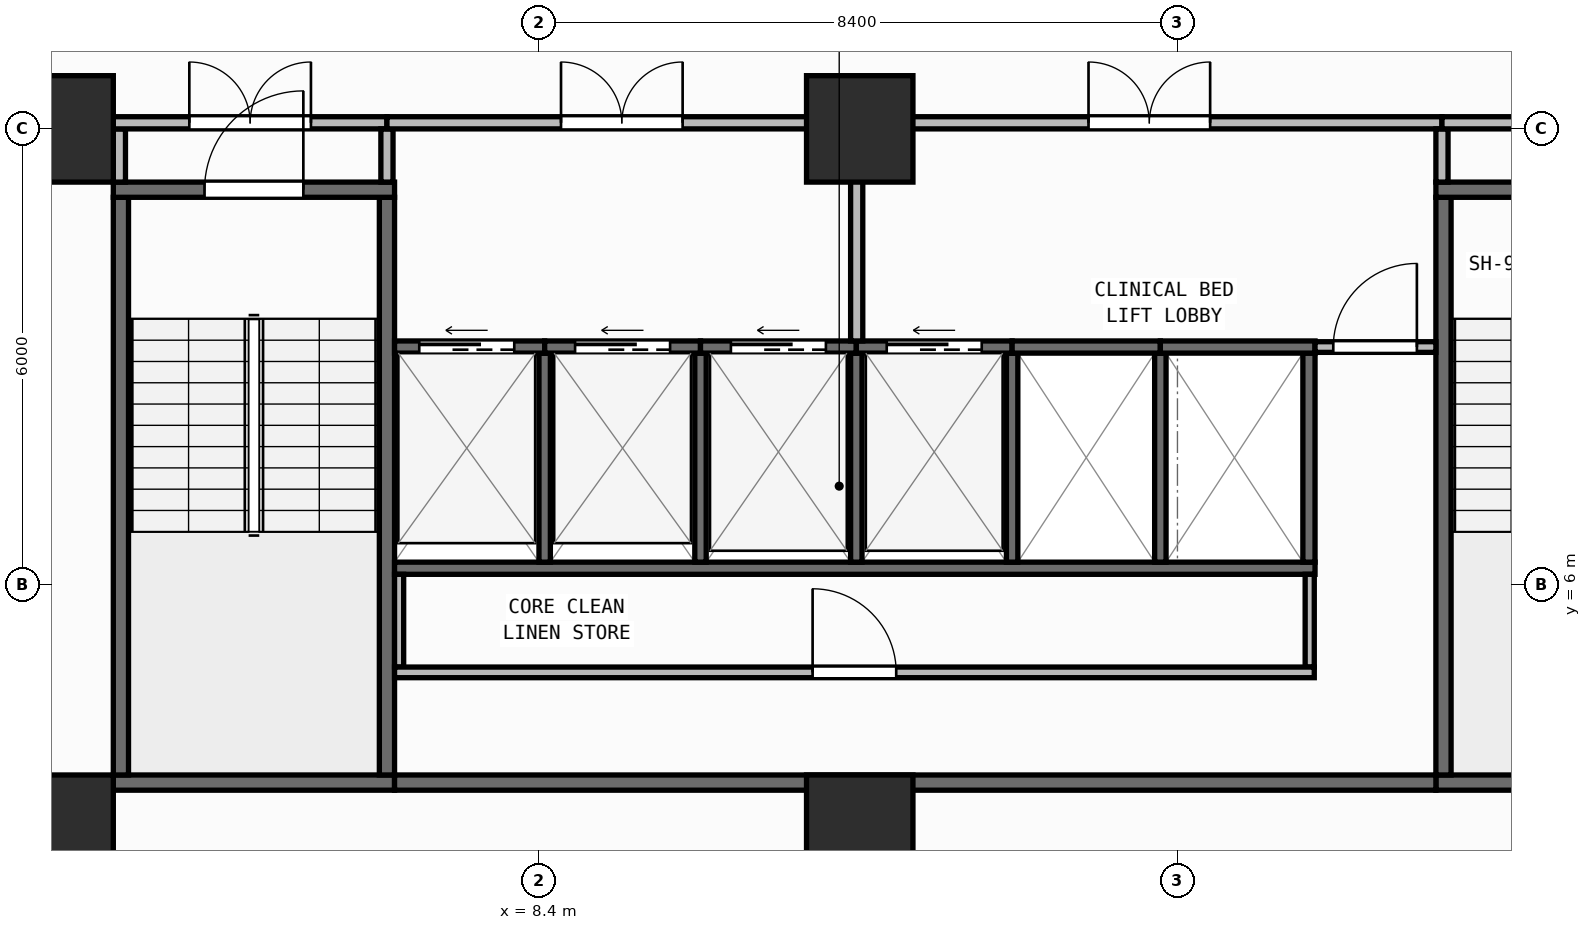
"""IFC4 building model, lengths in metres.
Left out: names, types, materials, properties, quantities, classifications, styles, units other than length and angle.
Written with IfcOpenShell. Run it as: python <this file> out.ifc"""

import sys

from ifc_helpers import new_model, si_unit, direction, frame, frame_2d, origin, origin_2d, place, context, subcontext, project, spatial, rectangle, extrude, element, fill, save


model = new_model("IFC4")
c1 = context("Model", 3, precision=1e-05, world=origin(), true_north=direction((0.0, 1.0)))
c2 = subcontext(c1, "Body", "Model", "MODEL_VIEW")
j1 = project(units=[si_unit("LENGTHUNIT", "METRE"), si_unit("PLANEANGLEUNIT", "RADIAN")], contexts=[c1])
p1 = place(None, origin())
s1 = spatial("IfcSite", under=j1, at=p1, CompositionType="ELEMENT")
p2 = place(p1, origin())
s2 = spatial("IfcBuilding", under=s1, at=p2, CompositionType="ELEMENT")
p3 = place(p2, frame((0.0, 0.0, 65.95)))
s3 = spatial("IfcBuildingStorey", under=s2, at=p3, CompositionType="ELEMENT", Elevation=65.95)
for number, where, z_axis, x_axis in (
    (1, (2.1, 2.8, 0.0), (0.0, 0.0, 1.0), (1.0, 0.0, 0.0)),
    (2, (12.62, 2.8, 0.0), (0.0, 0.0, 1.0), (1.0, 0.0, 0.0)),
    (3, (2.1, 12.0, 0.0), (0.0, 0.0, 1.0), (1.0, 0.0, 0.0)),
    (4, (12.62, 12.0, 0.0), (0.0, 0.0, 1.0), (1.0, 0.0, 0.0)),
):
    element("IfcColumn", number, at=place(p3, frame(where, z_axis=z_axis, x_axis=x_axis)), inside=s3, PredefinedType="COLUMN", context=c2, shape_type="SweptSolid", body=[
        extrude(rectangle(XDim=1.4, YDim=1.4, at=origin_2d()), origin(), (0.0, 0.0, 1.0), 3.95),
    ])
p4 = place(p3, frame((2.76, 0.174, 0.0), z_axis=(0.0, 0.0, 1.0), x_axis=(0.996571478456, 0.082736257641, 0.0)))
e5 = element("IfcWall", 5, at=p4, inside=s3, PredefinedType="STANDARD", context=c2, shape_type="SweptSolid", body=[
    extrude(rectangle(XDim=52.861, YDim=0.26, at=frame_2d((26.431, 0.0))), origin(), (0.0, 0.0, 1.0), 3.71),
])
p5 = place(p4, frame((25.231, 0.0, 0.9)))
e6 = element("IfcOpeningElement", 6, at=p5, cuts=e5, PredefinedType="OPENING", context=c2, shape_type="SweptSolid", body=[
    extrude(rectangle(XDim=2.4, YDim=1.65, at=frame_2d((1.2, 0.825))), frame((0.0, 0.14, 0.0), z_axis=(0.0, -1.0, 0.0), x_axis=(1.0, 0.0, 0.0)), (0.0, 0.0, 1.0), 0.28),
])
p6 = place(p3, frame((2.8, 3.4, 0.0), z_axis=(0.0, 0.0, 1.0), x_axis=(1.0, 0.0, 0.0)))
e7 = element("IfcWall", 7, at=p6, inside=s3, PredefinedType="SHEAR", context=c2, shape_type="SweptSolid", body=[
    extrude(rectangle(XDim=3.7, YDim=0.2, at=frame_2d((1.85, 0.0))), origin(), (0.0, 0.0, 1.0), 3.71),
])
for number, where, z_axis, x_axis in (
    (8, (2.9, 3.5, 0.0), (0.0, 0.0, 1.0), (0.0, 1.0, 0.0)),
    (9, (6.4, 3.5, 0.0), (0.0, 0.0, 1.0), (0.0, 1.0, 0.0)),
):
    element("IfcWall", number, at=place(p3, frame(where, z_axis=z_axis, x_axis=x_axis)), inside=s3, PredefinedType="SHEAR", context=c2, shape_type="SweptSolid", body=[
        extrude(rectangle(XDim=7.6, YDim=0.2, at=frame_2d((3.8, 0.0))), origin(), (0.0, 0.0, 1.0), 3.71),
    ])
p7 = place(p3, frame((2.8, 11.2, 0.0), z_axis=(0.0, 0.0, 1.0), x_axis=(1.0, 0.0, 0.0)))
e10 = element("IfcWall", 10, at=p7, inside=s3, PredefinedType="SHEAR", context=c2, shape_type="SweptSolid", body=[
    extrude(rectangle(XDim=3.7, YDim=0.2, at=frame_2d((1.85, 0.0))), origin(), (0.0, 0.0, 1.0), 3.71),
])
p8 = place(p7, frame((1.2, 0.0, 0.0)))
e11 = element("IfcOpeningElement", 11, at=p8, cuts=e10, PredefinedType="OPENING", context=c2, shape_type="SweptSolid", body=[
    extrude(rectangle(XDim=1.3, YDim=2.15, at=frame_2d((0.65, 1.075))), frame((0.0, 0.11, 0.0), z_axis=(0.0, -1.0, 0.0), x_axis=(1.0, 0.0, 0.0)), (0.0, 0.0, 1.0), 0.22),
])
p9 = place(p3, frame((20.2, 3.4, 0.0), z_axis=(0.0, 0.0, 1.0), x_axis=(1.0, 0.0, 0.0)))
e12 = element("IfcWall", 12, at=p9, inside=s3, PredefinedType="SHEAR", context=c2, shape_type="SweptSolid", body=[
    extrude(rectangle(XDim=3.7, YDim=0.2, at=frame_2d((1.85, 0.0))), origin(), (0.0, 0.0, 1.0), 3.71),
])
p10 = place(p3, frame((20.3, 3.5, 0.0), z_axis=(0.0, 0.0, 1.0), x_axis=(0.0, 1.0, 0.0)))
e13 = element("IfcWall", 13, at=p10, inside=s3, PredefinedType="SHEAR", context=c2, shape_type="SweptSolid", body=[
    extrude(rectangle(XDim=7.6, YDim=0.2, at=frame_2d((3.8, 0.0))), origin(), (0.0, 0.0, 1.0), 3.71),
])
p11 = place(p3, frame((20.2, 11.2, 0.0), z_axis=(0.0, 0.0, 1.0), x_axis=(1.0, 0.0, 0.0)))
e14 = element("IfcWall", 14, at=p11, inside=s3, PredefinedType="SHEAR", context=c2, shape_type="SweptSolid", body=[
    extrude(rectangle(XDim=3.7, YDim=0.2, at=frame_2d((1.85, 0.0))), origin(), (0.0, 0.0, 1.0), 3.71),
])
p12 = place(p11, frame((1.2, 0.0, 0.0)))
e15 = element("IfcOpeningElement", 15, at=p12, cuts=e14, PredefinedType="OPENING", context=c2, shape_type="SweptSolid", body=[
    extrude(rectangle(XDim=1.3, YDim=2.15, at=frame_2d((0.65, 1.075))), frame((0.0, 0.11, 0.0), z_axis=(0.0, -1.0, 0.0), x_axis=(1.0, 0.0, 0.0)), (0.0, 0.0, 1.0), 0.22),
])
p13 = place(p3, frame((6.5, 3.4, 0.0), z_axis=(0.0, 0.0, 1.0), x_axis=(1.0, 0.0, 0.0)))
e16 = element("IfcWall", 16, at=p13, inside=s3, PredefinedType="SHEAR", context=c2, shape_type="SweptSolid", body=[
    extrude(rectangle(XDim=13.7, YDim=0.2, at=frame_2d((6.85, 0.0))), origin(), (0.0, 0.0, 1.0), 3.71),
])
p14 = place(p3, frame((6.5, 6.22, 0.0), z_axis=(0.0, 0.0, 1.0), x_axis=(1.0, 0.0, 0.0)))
e17 = element("IfcWall", 17, at=p14, inside=s3, PredefinedType="SHEAR", context=c2, shape_type="SweptSolid", body=[
    extrude(rectangle(XDim=12.11, YDim=0.16, at=frame_2d((6.055, 0.0))), origin(), (0.0, 0.0, 1.0), 3.71),
])
p15 = place(p3, frame((18.53, 6.3, 0.0), z_axis=(0.0, 0.0, 1.0), x_axis=(0.0, 1.0, 0.0)))
e18 = element("IfcWall", 18, at=p15, inside=s3, PredefinedType="SHEAR", context=c2, shape_type="SweptSolid", body=[
    extrude(rectangle(XDim=2.75, YDim=0.16, at=frame_2d((1.375, 0.0))), origin(), (0.0, 0.0, 1.0), 3.71),
])
for number, where, z_axis, x_axis in (
    (19, (8.475, 6.3, 0.0), (0.0, 0.0, 1.0), (0.0, 1.0, 0.0)),
    (20, (10.525, 6.3, 0.0), (0.0, 0.0, 1.0), (0.0, 1.0, 0.0)),
    (21, (12.575, 6.3, 0.0), (0.0, 0.0, 1.0), (0.0, 1.0, 0.0)),
    (22, (14.625, 6.3, 0.0), (0.0, 0.0, 1.0), (0.0, 1.0, 0.0)),
    (23, (16.575, 6.3, 0.0), (0.0, 0.0, 1.0), (0.0, 1.0, 0.0)),
):
    element("IfcWall", number, at=place(p3, frame(where, z_axis=z_axis, x_axis=x_axis)), inside=s3, PredefinedType="SHEAR", context=c2, shape_type="SweptSolid", body=[
        extrude(rectangle(XDim=2.75, YDim=0.15, at=frame_2d((1.375, 0.0))), origin(), (0.0, 0.0, 1.0), 3.71),
    ])
p16 = place(p3, frame((6.5, 9.13, 0.0), z_axis=(0.0, 0.0, 1.0), x_axis=(1.0, 0.0, 0.0)))
e24 = element("IfcWall", 24, at=p16, inside=s3, PredefinedType="SHEAR", context=c2, shape_type="SweptSolid", body=[
    extrude(rectangle(XDim=1.975, YDim=0.16, at=frame_2d((0.988, 0.0))), origin(), (0.0, 0.0, 1.0), 3.71),
])
p17 = place(p16, frame((0.325, 0.0, 0.0)))
e25 = element("IfcOpeningElement", 25, at=p17, cuts=e24, PredefinedType="OPENING", context=c2, shape_type="SweptSolid", body=[
    extrude(rectangle(XDim=1.25, YDim=2.15, at=frame_2d((0.625, 1.075))), frame((0.0, 0.09, 0.0), z_axis=(0.0, -1.0, 0.0), x_axis=(1.0, 0.0, 0.0)), (0.0, 0.0, 1.0), 0.18),
])
p18 = place(p3, frame((8.475, 9.13, 0.0), z_axis=(0.0, 0.0, 1.0), x_axis=(1.0, 0.0, 0.0)))
e26 = element("IfcWall", 26, at=p18, inside=s3, PredefinedType="SHEAR", context=c2, shape_type="SweptSolid", body=[
    extrude(rectangle(XDim=2.05, YDim=0.16, at=frame_2d((1.025, 0.0))), origin(), (0.0, 0.0, 1.0), 3.71),
])
p19 = place(p18, frame((0.4, 0.0, 0.0)))
e27 = element("IfcOpeningElement", 27, at=p19, cuts=e26, PredefinedType="OPENING", context=c2, shape_type="SweptSolid", body=[
    extrude(rectangle(XDim=1.25, YDim=2.15, at=frame_2d((0.625, 1.075))), frame((0.0, 0.09, 0.0), z_axis=(0.0, -1.0, 0.0), x_axis=(1.0, 0.0, 0.0)), (0.0, 0.0, 1.0), 0.18),
])
p20 = place(p3, frame((10.525, 9.13, 0.0), z_axis=(0.0, 0.0, 1.0), x_axis=(1.0, 0.0, 0.0)))
e28 = element("IfcWall", 28, at=p20, inside=s3, PredefinedType="SHEAR", context=c2, shape_type="SweptSolid", body=[
    extrude(rectangle(XDim=2.05, YDim=0.16, at=frame_2d((1.025, 0.0))), origin(), (0.0, 0.0, 1.0), 3.71),
])
p21 = place(p20, frame((0.4, 0.0, 0.0)))
e29 = element("IfcOpeningElement", 29, at=p21, cuts=e28, PredefinedType="OPENING", context=c2, shape_type="SweptSolid", body=[
    extrude(rectangle(XDim=1.25, YDim=2.15, at=frame_2d((0.625, 1.075))), frame((0.0, 0.09, 0.0), z_axis=(0.0, -1.0, 0.0), x_axis=(1.0, 0.0, 0.0)), (0.0, 0.0, 1.0), 0.18),
])
p22 = place(p3, frame((12.575, 9.13, 0.0), z_axis=(0.0, 0.0, 1.0), x_axis=(1.0, 0.0, 0.0)))
e30 = element("IfcWall", 30, at=p22, inside=s3, PredefinedType="SHEAR", context=c2, shape_type="SweptSolid", body=[
    extrude(rectangle(XDim=2.05, YDim=0.16, at=frame_2d((1.025, 0.0))), origin(), (0.0, 0.0, 1.0), 3.71),
])
p23 = place(p22, frame((0.4, 0.0, 0.0)))
e31 = element("IfcOpeningElement", 31, at=p23, cuts=e30, PredefinedType="OPENING", context=c2, shape_type="SweptSolid", body=[
    extrude(rectangle(XDim=1.25, YDim=2.15, at=frame_2d((0.625, 1.075))), frame((0.0, 0.09, 0.0), z_axis=(0.0, -1.0, 0.0), x_axis=(1.0, 0.0, 0.0)), (0.0, 0.0, 1.0), 0.18),
])
p24 = place(p3, frame((14.625, 9.13, 0.0), z_axis=(0.0, 0.0, 1.0), x_axis=(1.0, 0.0, 0.0)))
e32 = element("IfcWall", 32, at=p24, inside=s3, PredefinedType="SHEAR", context=c2, shape_type="SweptSolid", body=[
    extrude(rectangle(XDim=1.95, YDim=0.16, at=frame_2d((0.975, 0.0))), origin(), (0.0, 0.0, 1.0), 3.71),
])
p25 = place(p3, frame((16.575, 9.13, 0.0), z_axis=(0.0, 0.0, 1.0), x_axis=(1.0, 0.0, 0.0)))
e33 = element("IfcWall", 33, at=p25, inside=s3, PredefinedType="SHEAR", context=c2, shape_type="SweptSolid", body=[
    extrude(rectangle(XDim=2.035, YDim=0.16, at=frame_2d((1.018, 0.0))), origin(), (0.0, 0.0, 1.0), 3.71),
])
for number, where, z_axis, x_axis in (
    (34, (6.56, 4.92, 0.0), (0.0, 0.0, 1.0), (0.0, 1.0, 0.0)),
    (35, (18.54, 4.92, 0.0), (0.0, 0.0, 1.0), (0.0, 1.0, 0.0)),
):
    element("IfcWall", number, at=place(p3, frame(where, z_axis=z_axis, x_axis=x_axis)), inside=s3, PredefinedType="PARTITIONING", context=c2, shape_type="SweptSolid", body=[
        extrude(rectangle(XDim=1.22, YDim=0.12, at=frame_2d((0.61, 0.0))), origin(), (0.0, 0.0, 1.0), 3.71),
    ])
p26 = place(p3, frame((6.5, 4.85, 0.0), z_axis=(0.0, 0.0, 1.0), x_axis=(1.0, 0.0, 0.0)))
e36 = element("IfcWall", 36, at=p26, inside=s3, PredefinedType="PARTITIONING", context=c2, shape_type="SweptSolid", body=[
    extrude(rectangle(XDim=12.1, YDim=0.14, at=frame_2d((6.05, 0.0))), origin(), (0.0, 0.0, 1.0), 3.71),
])
p27 = place(p26, frame((5.5, 0.0, 0.0)))
e37 = element("IfcOpeningElement", 37, at=p27, cuts=e36, PredefinedType="OPENING", context=c2, shape_type="SweptSolid", body=[
    extrude(rectangle(XDim=1.1, YDim=2.1, at=frame_2d((0.55, 1.05))), frame((0.0, 0.08, 0.0), z_axis=(0.0, -1.0, 0.0), x_axis=(1.0, 0.0, 0.0)), (0.0, 0.0, 1.0), 0.16),
])
p28 = place(p3, frame((18.61, 9.13, 0.0), z_axis=(0.0, 0.0, 1.0), x_axis=(1.0, 0.0, 0.0)))
e38 = element("IfcWall", 38, at=p28, inside=s3, PredefinedType="PARTITIONING", context=c2, shape_type="SweptSolid", body=[
    extrude(rectangle(XDim=1.59, YDim=0.14, at=frame_2d((0.795, 0.0))), origin(), (0.0, 0.0, 1.0), 3.71),
])
p29 = place(p28, frame((0.24, 0.0, 0.0)))
e39 = element("IfcOpeningElement", 39, at=p29, cuts=e38, PredefinedType="OPENING", context=c2, shape_type="SweptSolid", body=[
    extrude(rectangle(XDim=1.1, YDim=2.1, at=frame_2d((0.55, 1.05))), frame((0.0, 0.08, 0.0), z_axis=(0.0, -1.0, 0.0), x_axis=(1.0, 0.0, 0.0)), (0.0, 0.0, 1.0), 0.16),
])
p30 = place(p3, frame((2.88, 11.3, 0.0), z_axis=(0.0, 0.0, 1.0), x_axis=(0.0, 1.0, 0.0)))
e40 = element("IfcWall", 40, at=p30, inside=s3, PredefinedType="PARTITIONING", context=c2, shape_type="SweptSolid", body=[
    extrude(rectangle(XDim=0.7, YDim=0.16, at=frame_2d((0.35, 0.0))), origin(), (0.0, 0.0, 1.0), 3.71),
])
p31 = place(p3, frame((2.8, 12.08, 0.0), z_axis=(0.0, 0.0, 1.0), x_axis=(1.0, 0.0, 0.0)))
e41 = element("IfcWall", 41, at=p31, inside=s3, PredefinedType="PARTITIONING", context=c2, shape_type="SweptSolid", body=[
    extrude(rectangle(XDim=3.6, YDim=0.16, at=frame_2d((1.8, 0.0))), origin(), (0.0, 0.0, 1.0), 3.073),
])
p32 = place(p31, frame((1.0, 0.0, 0.0)))
e42 = element("IfcOpeningElement", 42, at=p32, cuts=e41, PredefinedType="OPENING", context=c2, shape_type="SweptSolid", body=[
    extrude(rectangle(XDim=1.6, YDim=2.05, at=frame_2d((0.8, 1.025))), frame((0.0, 0.09, 0.0), z_axis=(0.0, -1.0, 0.0), x_axis=(1.0, 0.0, 0.0)), (0.0, 0.0, 1.0), 0.18),
])
p33 = place(p3, frame((6.4, 11.3, 0.0), z_axis=(0.0, 0.0, 1.0), x_axis=(0.0, 1.0, 0.0)))
e43 = element("IfcWall", 43, at=p33, inside=s3, PredefinedType="PARTITIONING", context=c2, shape_type="SweptSolid", body=[
    extrude(rectangle(XDim=0.7, YDim=0.16, at=frame_2d((0.35, 0.0))), origin(), (0.0, 0.0, 1.0), 3.71),
])
p34 = place(p3, frame((6.4, 12.08, 0.0), z_axis=(0.0, 0.0, 1.0), x_axis=(1.0, 0.0, 0.0)))
e44 = element("IfcWall", 44, at=p34, inside=s3, PredefinedType="PARTITIONING", context=c2, shape_type="SweptSolid", body=[
    extrude(rectangle(XDim=6.18, YDim=0.16, at=frame_2d((3.09, 0.0))), origin(), (0.0, 0.0, 1.0), 3.073),
])
p35 = place(p34, frame((2.29, 0.0, 0.0)))
e45 = element("IfcOpeningElement", 45, at=p35, cuts=e44, PredefinedType="OPENING", context=c2, shape_type="SweptSolid", body=[
    extrude(rectangle(XDim=1.6, YDim=2.05, at=frame_2d((0.8, 1.025))), frame((0.0, 0.09, 0.0), z_axis=(0.0, -1.0, 0.0), x_axis=(1.0, 0.0, 0.0)), (0.0, 0.0, 1.0), 0.18),
])
p36 = place(p3, frame((12.58, 9.21, 0.0), z_axis=(0.0, 0.0, 1.0), x_axis=(0.0, 1.0, 0.0)))
e46 = element("IfcWall", 46, at=p36, inside=s3, PredefinedType="PARTITIONING", context=c2, shape_type="SweptSolid", body=[
    extrude(rectangle(XDim=2.79, YDim=0.16, at=frame_2d((1.395, 0.0))), origin(), (0.0, 0.0, 1.0), 3.71),
])
p37 = place(p3, frame((12.58, 12.08, 0.0), z_axis=(0.0, 0.0, 1.0), x_axis=(1.0, 0.0, 0.0)))
e47 = element("IfcWall", 47, at=p37, inside=s3, PredefinedType="PARTITIONING", context=c2, shape_type="SweptSolid", body=[
    extrude(rectangle(XDim=7.7, YDim=0.16, at=frame_2d((3.85, 0.0))), origin(), (0.0, 0.0, 1.0), 3.073),
])
p38 = place(p37, frame((3.05, 0.0, 0.0)))
e48 = element("IfcOpeningElement", 48, at=p38, cuts=e47, PredefinedType="OPENING", context=c2, shape_type="SweptSolid", body=[
    extrude(rectangle(XDim=1.6, YDim=2.05, at=frame_2d((0.8, 1.025))), frame((0.0, 0.09, 0.0), z_axis=(0.0, -1.0, 0.0), x_axis=(1.0, 0.0, 0.0)), (0.0, 0.0, 1.0), 0.18),
])
p39 = place(p3, frame((20.28, 11.3, 0.0), z_axis=(0.0, 0.0, 1.0), x_axis=(0.0, 1.0, 0.0)))
e49 = element("IfcWall", 49, at=p39, inside=s3, PredefinedType="PARTITIONING", context=c2, shape_type="SweptSolid", body=[
    extrude(rectangle(XDim=0.7, YDim=0.16, at=frame_2d((0.35, 0.0))), origin(), (0.0, 0.0, 1.0), 3.71),
])
p40 = place(p3, frame((20.28, 12.08, 0.0), z_axis=(0.0, 0.0, 1.0), x_axis=(1.0, 0.0, 0.0)))
e50 = element("IfcWall", 50, at=p40, inside=s3, PredefinedType="PARTITIONING", context=c2, shape_type="SweptSolid", body=[
    extrude(rectangle(XDim=3.62, YDim=0.16, at=frame_2d((1.81, 0.0))), origin(), (0.0, 0.0, 1.0), 3.073),
])
p41 = place(p40, frame((1.01, 0.0, 0.0)))
e51 = element("IfcOpeningElement", 51, at=p41, cuts=e50, PredefinedType="OPENING", context=c2, shape_type="SweptSolid", body=[
    extrude(rectangle(XDim=1.6, YDim=2.05, at=frame_2d((0.8, 1.025))), frame((0.0, 0.09, 0.0), z_axis=(0.0, -1.0, 0.0), x_axis=(1.0, 0.0, 0.0)), (0.0, 0.0, 1.0), 0.18),
])
p42 = place(p8, origin())
e52 = element("IfcDoor", 52, at=p42, inside=s3, OperationType="SINGLE_SWING_RIGHT", PredefinedType="DOOR", context=c2, shape_type="SweptSolid", body=[
    extrude(rectangle(XDim=1.3, YDim=2.15, at=frame_2d((0.65, 1.075))), frame((0.0, 0.025, 0.0), z_axis=(0.0, -1.0, 0.0), x_axis=(1.0, 0.0, 0.0)), (0.0, 0.0, 1.0), 0.05),
])
fill(e11, e52)
p43 = place(p17, origin())
e53 = element("IfcDoor", 53, at=p43, inside=s3, OperationType="SLIDING_TO_LEFT", PredefinedType="DOOR", context=c2, shape_type="SweptSolid", body=[
    extrude(rectangle(XDim=1.25, YDim=2.15, at=frame_2d((0.625, 1.075))), frame((0.0, 0.025, 0.0), z_axis=(0.0, -1.0, 0.0), x_axis=(1.0, 0.0, 0.0)), (0.0, 0.0, 1.0), 0.05),
])
fill(e25, e53)
p44 = place(p19, origin())
e54 = element("IfcDoor", 54, at=p44, inside=s3, OperationType="SLIDING_TO_LEFT", PredefinedType="DOOR", context=c2, shape_type="SweptSolid", body=[
    extrude(rectangle(XDim=1.25, YDim=2.15, at=frame_2d((0.625, 1.075))), frame((0.0, 0.025, 0.0), z_axis=(0.0, -1.0, 0.0), x_axis=(1.0, 0.0, 0.0)), (0.0, 0.0, 1.0), 0.05),
])
fill(e27, e54)
p45 = place(p21, origin())
e55 = element("IfcDoor", 55, at=p45, inside=s3, OperationType="SLIDING_TO_LEFT", PredefinedType="DOOR", context=c2, shape_type="SweptSolid", body=[
    extrude(rectangle(XDim=1.25, YDim=2.15, at=frame_2d((0.625, 1.075))), frame((0.0, 0.025, 0.0), z_axis=(0.0, -1.0, 0.0), x_axis=(1.0, 0.0, 0.0)), (0.0, 0.0, 1.0), 0.05),
])
fill(e29, e55)
p46 = place(p23, origin())
e56 = element("IfcDoor", 56, at=p46, inside=s3, OperationType="SLIDING_TO_LEFT", PredefinedType="DOOR", context=c2, shape_type="SweptSolid", body=[
    extrude(rectangle(XDim=1.25, YDim=2.15, at=frame_2d((0.625, 1.075))), frame((0.0, 0.025, 0.0), z_axis=(0.0, -1.0, 0.0), x_axis=(1.0, 0.0, 0.0)), (0.0, 0.0, 1.0), 0.05),
])
fill(e31, e56)
p47 = place(p27, origin())
e57 = element("IfcDoor", 57, at=p47, inside=s3, OperationType="SINGLE_SWING_LEFT", PredefinedType="DOOR", context=c2, shape_type="SweptSolid", body=[
    extrude(rectangle(XDim=1.1, YDim=2.1, at=frame_2d((0.55, 1.05))), frame((0.0, 0.025, 0.0), z_axis=(0.0, -1.0, 0.0), x_axis=(1.0, 0.0, 0.0)), (0.0, 0.0, 1.0), 0.05),
])
fill(e37, e57)
p48 = place(p29, origin())
e58 = element("IfcDoor", 58, at=p48, inside=s3, OperationType="SINGLE_SWING_RIGHT", PredefinedType="DOOR", context=c2, shape_type="SweptSolid", body=[
    extrude(rectangle(XDim=1.1, YDim=2.1, at=frame_2d((0.55, 1.05))), frame((0.0, 0.025, 0.0), z_axis=(0.0, -1.0, 0.0), x_axis=(1.0, 0.0, 0.0)), (0.0, 0.0, 1.0), 0.05),
])
fill(e39, e58)
p49 = place(p32, origin())
e59 = element("IfcDoor", 59, at=p49, inside=s3, OperationType="DOUBLE_DOOR_SINGLE_SWING", PredefinedType="DOOR", context=c2, shape_type="SweptSolid", body=[
    extrude(rectangle(XDim=1.6, YDim=2.05, at=frame_2d((0.8, 1.025))), frame((0.0, 0.025, 0.0), z_axis=(0.0, -1.0, 0.0), x_axis=(1.0, 0.0, 0.0)), (0.0, 0.0, 1.0), 0.05),
])
fill(e42, e59)
p50 = place(p35, origin())
e60 = element("IfcDoor", 60, at=p50, inside=s3, OperationType="DOUBLE_DOOR_SINGLE_SWING", PredefinedType="DOOR", context=c2, shape_type="SweptSolid", body=[
    extrude(rectangle(XDim=1.6, YDim=2.05, at=frame_2d((0.8, 1.025))), frame((0.0, 0.025, 0.0), z_axis=(0.0, -1.0, 0.0), x_axis=(1.0, 0.0, 0.0)), (0.0, 0.0, 1.0), 0.05),
])
fill(e45, e60)
p51 = place(p38, origin())
e61 = element("IfcDoor", 61, at=p51, inside=s3, OperationType="DOUBLE_DOOR_SINGLE_SWING", PredefinedType="DOOR", context=c2, shape_type="SweptSolid", body=[
    extrude(rectangle(XDim=1.6, YDim=2.05, at=frame_2d((0.8, 1.025))), frame((0.0, 0.025, 0.0), z_axis=(0.0, -1.0, 0.0), x_axis=(1.0, 0.0, 0.0)), (0.0, 0.0, 1.0), 0.05),
])
fill(e48, e61)
save(model, sys.argv[1])
